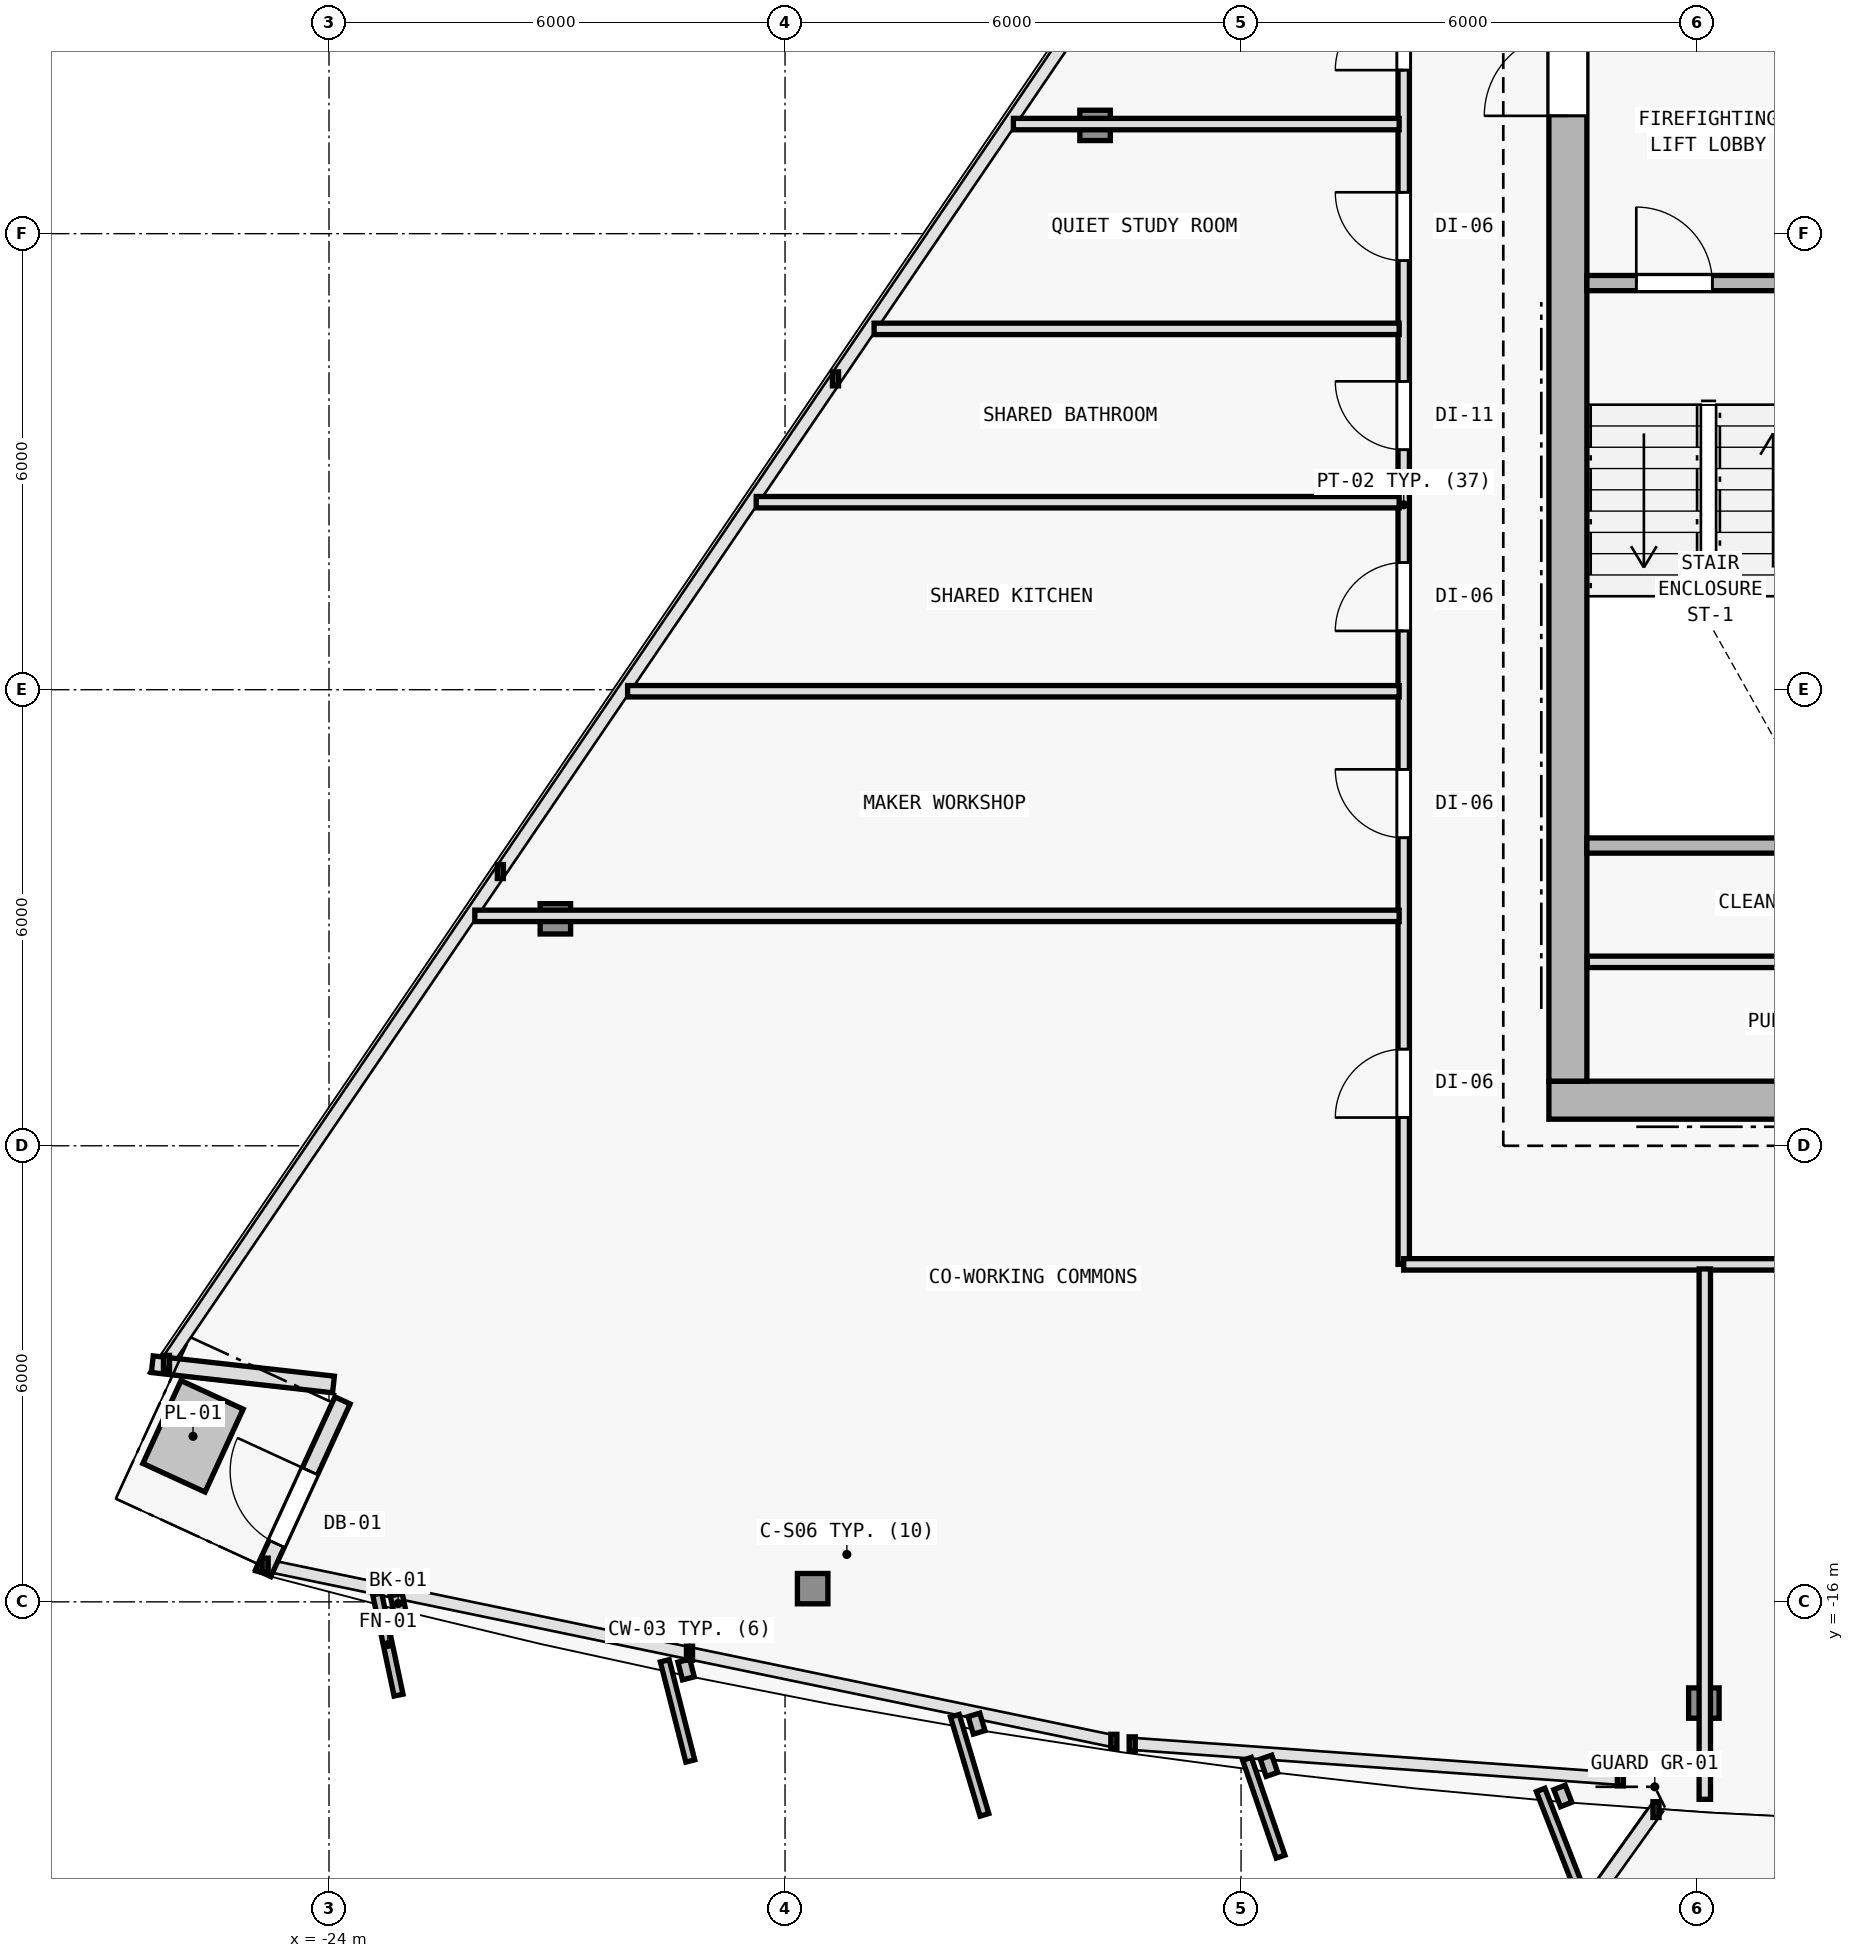
"""IFC4 building model, lengths in metres.
Left out: names, types, materials, properties, quantities, classifications, styles, units other than length and angle.
Written with IfcOpenShell. Run it as: python <this file> out.ifc"""

import sys

from ifc_helpers import new_model, si_unit, direction, frame, frame_2d, origin, origin_2d, place, context, subcontext, project, spatial, rectangle, i_section, extrude, element, fill, save


model = new_model("IFC4")
c1 = context("Model", 3, precision=1e-05, world=origin(), true_north=direction((0.0, 1.0)))
c2 = subcontext(c1, "Body", "Model", "MODEL_VIEW")
j1 = project(units=[si_unit("LENGTHUNIT", "METRE"), si_unit("PLANEANGLEUNIT", "RADIAN")], contexts=[c1])
p1 = place(None, origin())
s1 = spatial("IfcSite", under=j1, at=p1, CompositionType="ELEMENT")
p2 = place(p1, origin())
s2 = spatial("IfcBuilding", under=s1, at=p2, CompositionType="ELEMENT")
p3 = place(p2, frame((0.0, 0.0, 163.8)))
s3 = spatial("IfcBuildingStorey", under=s2, at=p3, CompositionType="ELEMENT", Elevation=163.8)
for number, where, z_axis, x_axis in (
    (1, (-7.7, -9.4, 0.0), (0.0, 0.0, 1.0), (1.0, 0.0, 0.0)),
    (2, (-7.7, 2.0, 0.0), (0.0, 0.0, 1.0), (1.0, 0.0, 0.0)),
):
    element("IfcColumn", number, at=place(p3, frame(where, z_axis=z_axis, x_axis=x_axis)), inside=s3, PredefinedType="COLUMN", context=c2, shape_type="SweptSolid", body=[
        extrude(i_section(OverallWidth=0.404, OverallDepth=0.407, WebThickness=0.017, FlangeThickness=0.028, FilletRadius=0.015, at=origin_2d()), origin(), (0.0, 0.0, 1.0), 3.6),
    ])
p4 = place(p3, frame((-17.637, -15.826, 0.005), z_axis=(0.020662834962, 0.033509136961, 0.999224792022), x_axis=(-0.851183725565, 0.524867855115, 0.0)))
e3 = element("IfcColumn", 3, at=p4, inside=s3, PredefinedType="COLUMN", context=c2, shape_type="SweptSolid", body=[
    extrude(i_section(OverallWidth=0.401, OverallDepth=0.399, WebThickness=0.016, FlangeThickness=0.025, FilletRadius=0.015, at=origin_2d()), origin(), (0.0, 0.0, 1.0), 3.592),
])
p5 = place(p3, frame((-5.911, -17.332, 0.005), z_axis=(0.00693381708, 0.03528089279, 0.999353381334), x_axis=(-0.981229659911, 0.192842823335, 0.0)))
e4 = element("IfcColumn", 4, at=p5, inside=s3, PredefinedType="COLUMN", context=c2, shape_type="SweptSolid", body=[
    extrude(i_section(OverallWidth=0.401, OverallDepth=0.399, WebThickness=0.016, FlangeThickness=0.025, FilletRadius=0.015, at=origin_2d()), origin(), (0.0, 0.0, 1.0), 3.592),
])
p6 = place(p3, frame((-13.921, 3.425, 0.005), z_axis=(0.017070406608, 0.009521342331, 0.99980895438), x_axis=(-0.487119351792, 0.873335409284, 0.0)))
e5 = element("IfcColumn", 5, at=p6, inside=s3, PredefinedType="COLUMN", context=c2, shape_type="SweptSolid", body=[
    extrude(i_section(OverallWidth=0.401, OverallDepth=0.399, WebThickness=0.016, FlangeThickness=0.025, FilletRadius=0.015, at=origin_2d()), origin(), (0.0, 0.0, 1.0), 3.59),
])
p7 = place(p3, frame((-21.022, -7.014, 0.005), z_axis=(0.025222449659, 0.021619242565, 0.999448065876), x_axis=(-0.650791373456, 0.759256602365, 0.0)))
e6 = element("IfcColumn", 6, at=p7, inside=s3, PredefinedType="COLUMN", context=c2, shape_type="SweptSolid", body=[
    extrude(i_section(OverallWidth=0.401, OverallDepth=0.399, WebThickness=0.016, FlangeThickness=0.025, FilletRadius=0.015, at=origin_2d()), origin(), (0.0, 0.0, 1.0), 3.591),
])
p8 = place(p3, frame((-23.941, -13.14, 0.0), z_axis=(0.0, 0.0, 1.0), x_axis=(-0.993825249999, 0.110956624245, 0.0)))
e7 = element("IfcWall", 7, at=p8, inside=s3, PredefinedType="SOLIDWALL", context=c2, shape_type="SweptSolid", body=[
    extrude(rectangle(XDim=2.398, YDim=0.22, at=frame_2d((1.199, 0.0))), origin(), (0.0, 0.0, 1.0), 3.35),
])
p9 = place(p3, frame((-24.866, -15.622, 0.0), z_axis=(0.0, 0.0, 1.0), x_axis=(0.417478378529, 0.908686856657, 0.0)))
e8 = element("IfcWall", 8, at=p9, inside=s3, PredefinedType="SOLIDWALL", context=c2, shape_type="SweptSolid", body=[
    extrude(rectangle(XDim=2.5, YDim=0.22, at=frame_2d((1.25, 0.0))), origin(), (0.0, 0.0, 1.0), 3.35),
])
p10 = place(p9, frame((0.425, 0.0, 0.0)))
e9 = element("IfcOpeningElement", 9, at=p10, cuts=e8, PredefinedType="OPENING", context=c2, shape_type="SweptSolid", body=[
    extrude(rectangle(XDim=1.05, YDim=2.15, at=frame_2d((0.525, 1.075))), frame((0.0, 0.12, 0.0), z_axis=(0.0, -1.0, 0.0), x_axis=(1.0, 0.0, 0.0)), (0.0, 0.0, 1.0), 0.24),
])
p11 = place(p3, frame((-7.95, -9.4, 0.0), z_axis=(0.0, 0.0, 1.0), x_axis=(1.0, 0.0, 0.0)))
e10 = element("IfcWall", 10, at=p11, inside=s3, PredefinedType="SHEAR", context=c2, shape_type="SweptSolid", body=[
    extrude(rectangle(XDim=15.9, YDim=0.5, at=frame_2d((7.95, 0.0))), origin(), (0.0, 0.0, 1.0), 3.35),
])
p12 = place(p11, frame((9.6, 0.0, 0.0)))
e11 = element("IfcOpeningElement", 11, at=p12, cuts=e10, PredefinedType="OPENING", context=c2, shape_type="SweptSolid", body=[
    extrude(rectangle(XDim=1.5, YDim=2.2, at=frame_2d((0.75, 1.1))), frame((0.0, 0.26, 0.0), z_axis=(0.0, -1.0, 0.0), x_axis=(1.0, 0.0, 0.0)), (0.0, 0.0, 1.0), 0.52),
])
p13 = place(p3, frame((-7.7, -9.15, 0.0), z_axis=(0.0, 0.0, 1.0), x_axis=(0.0, 1.0, 0.0)))
e12 = element("IfcWall", 12, at=p13, inside=s3, PredefinedType="SHEAR", context=c2, shape_type="SweptSolid", body=[
    extrude(rectangle(XDim=19.1, YDim=0.5, at=frame_2d((9.55, 0.0))), origin(), (0.0, 0.0, 1.0), 3.35),
])
p14 = place(p13, frame((12.7, 0.0, 0.0)))
e13 = element("IfcOpeningElement", 13, at=p14, cuts=e12, PredefinedType="OPENING", context=c2, shape_type="SweptSolid", body=[
    extrude(rectangle(XDim=1.1, YDim=2.15, at=frame_2d((0.55, 1.075))), frame((0.0, 0.26, 0.0), z_axis=(0.0, -1.0, 0.0), x_axis=(1.0, 0.0, 0.0)), (0.0, 0.0, 1.0), 0.52),
])
p15 = place(p3, frame((-7.45, 1.35, 0.0), z_axis=(0.0, 0.0, 1.0), x_axis=(1.0, 0.0, 0.0)))
e14 = element("IfcWall", 14, at=p15, inside=s3, PredefinedType="SOLIDWALL", context=c2, shape_type="SweptSolid", body=[
    extrude(rectangle(XDim=3.4, YDim=0.2, at=frame_2d((1.7, 0.0))), origin(), (0.0, 0.0, 1.0), 3.35),
])
p16 = place(p15, frame((0.65, 0.0, 0.0)))
e15 = element("IfcOpeningElement", 15, at=p16, cuts=e14, PredefinedType="OPENING", context=c2, shape_type="SweptSolid", body=[
    extrude(rectangle(XDim=1.0, YDim=2.15, at=frame_2d((0.5, 1.075))), frame((0.0, 0.11, 0.0), z_axis=(0.0, -1.0, 0.0), x_axis=(1.0, 0.0, 0.0)), (0.0, 0.0, 1.0), 0.22),
])
p17 = place(p3, frame((-7.45, -6.05, 0.0), z_axis=(0.0, 0.0, 1.0), x_axis=(1.0, 0.0, 0.0)))
e16 = element("IfcWall", 16, at=p17, inside=s3, PredefinedType="SOLIDWALL", context=c2, shape_type="SweptSolid", body=[
    extrude(rectangle(XDim=3.4, YDim=0.2, at=frame_2d((1.7, 0.0))), origin(), (0.0, 0.0, 1.0), 3.35),
])
p18 = place(p3, frame((-7.445, -7.58, 0.0), z_axis=(0.0, 0.0, 1.0), x_axis=(1.0, 0.0, 0.0)))
e17 = element("IfcWall", 17, at=p18, inside=s3, PredefinedType="PARTITIONING", context=c2, shape_type="SweptSolid", body=[
    extrude(rectangle(XDim=6.195, YDim=0.15, at=frame_2d((3.098, 0.0))), origin(), (0.0, 0.0, 1.0), 3.35),
])
p19 = place(p3, frame((-9.86, -11.56, 0.0), z_axis=(0.0, 0.0, 1.0), x_axis=(0.0, 1.0, 0.0)))
e18 = element("IfcWall", 18, at=p19, inside=s3, PredefinedType="PARTITIONING", context=c2, shape_type="SweptSolid", body=[
    extrude(rectangle(XDim=19.986, YDim=0.15, at=frame_2d((9.993, 0.0))), origin(), (0.0, 0.0, 1.0), 2.725),
])
p20 = place(p19, frame((10.717, 0.0, 0.0)))
e19 = element("IfcOpeningElement", 19, at=p20, cuts=e18, PredefinedType="OPENING", context=c2, shape_type="SweptSolid", body=[
    extrude(rectangle(XDim=0.9, YDim=2.1, at=frame_2d((0.45, 1.05))), frame((0.0, 0.085, 0.0), z_axis=(0.0, -1.0, 0.0), x_axis=(1.0, 0.0, 0.0)), (0.0, 0.0, 1.0), 0.17),
])
p21 = place(p19, frame((8.333, 0.0, 0.0)))
e20 = element("IfcOpeningElement", 20, at=p21, cuts=e18, PredefinedType="OPENING", context=c2, shape_type="SweptSolid", body=[
    extrude(rectangle(XDim=0.9, YDim=2.1, at=frame_2d((0.45, 1.05))), frame((0.0, 0.085, 0.0), z_axis=(0.0, -1.0, 0.0), x_axis=(1.0, 0.0, 0.0)), (0.0, 0.0, 1.0), 0.17),
])
p22 = place(p19, frame((5.612, 0.0, 0.0)))
e21 = element("IfcOpeningElement", 21, at=p22, cuts=e18, PredefinedType="OPENING", context=c2, shape_type="SweptSolid", body=[
    extrude(rectangle(XDim=0.9, YDim=2.1, at=frame_2d((0.45, 1.05))), frame((0.0, 0.085, 0.0), z_axis=(0.0, -1.0, 0.0), x_axis=(1.0, 0.0, 0.0)), (0.0, 0.0, 1.0), 0.17),
])
p23 = place(p19, frame((1.932, 0.0, 0.0)))
e22 = element("IfcOpeningElement", 22, at=p23, cuts=e18, PredefinedType="OPENING", context=c2, shape_type="SweptSolid", body=[
    extrude(rectangle(XDim=0.9, YDim=2.1, at=frame_2d((0.45, 1.05))), frame((0.0, 0.085, 0.0), z_axis=(0.0, -1.0, 0.0), x_axis=(1.0, 0.0, 0.0)), (0.0, 0.0, 1.0), 0.17),
])
p24 = place(p19, frame((18.115, 0.0, 0.0)))
e23 = element("IfcOpeningElement", 23, at=p24, cuts=e18, PredefinedType="OPENING", context=c2, shape_type="SweptSolid", body=[
    extrude(rectangle(XDim=0.9, YDim=2.1, at=frame_2d((0.45, 1.05))), frame((0.0, 0.085, 0.0), z_axis=(0.0, -1.0, 0.0), x_axis=(1.0, 0.0, 0.0)), (0.0, 0.0, 1.0), 0.17),
])
p25 = place(p19, frame((15.711, 0.0, 0.0)))
e24 = element("IfcOpeningElement", 24, at=p25, cuts=e18, PredefinedType="OPENING", context=c2, shape_type="SweptSolid", body=[
    extrude(rectangle(XDim=0.9, YDim=2.1, at=frame_2d((0.45, 1.05))), frame((0.0, 0.085, 0.0), z_axis=(0.0, -1.0, 0.0), x_axis=(1.0, 0.0, 0.0)), (0.0, 0.0, 1.0), 0.17),
])
p26 = place(p19, frame((13.205, 0.0, 0.0)))
e25 = element("IfcOpeningElement", 25, at=p26, cuts=e18, PredefinedType="OPENING", context=c2, shape_type="SweptSolid", body=[
    extrude(rectangle(XDim=0.9, YDim=2.1, at=frame_2d((0.45, 1.05))), frame((0.0, 0.085, 0.0), z_axis=(0.0, -1.0, 0.0), x_axis=(1.0, 0.0, 0.0)), (0.0, 0.0, 1.0), 0.17),
])
p27 = place(p3, frame((13.18, -11.56, 0.0), z_axis=(0.0, 0.0, 1.0), x_axis=(-1.0, 0.0, 0.0)))
e26 = element("IfcWall", 26, at=p27, inside=s3, PredefinedType="PARTITIONING", context=c2, shape_type="SweptSolid", body=[
    extrude(rectangle(XDim=23.04, YDim=0.15, at=frame_2d((11.52, 0.0))), origin(), (0.0, 0.0, 1.0), 2.725),
])
p28 = place(p27, frame((12.73, 0.0, 0.0)))
e27 = element("IfcOpeningElement", 27, at=p28, cuts=e26, PredefinedType="OPENING", context=c2, shape_type="SweptSolid", body=[
    extrude(rectangle(XDim=0.9, YDim=2.1, at=frame_2d((0.45, 1.05))), frame((0.0, 0.085, 0.0), z_axis=(0.0, -1.0, 0.0), x_axis=(1.0, 0.0, 0.0)), (0.0, 0.0, 1.0), 0.17),
])
p29 = place(p27, frame((3.28, 0.0, 0.0)))
e28 = element("IfcOpeningElement", 28, at=p29, cuts=e26, PredefinedType="OPENING", context=c2, shape_type="SweptSolid", body=[
    extrude(rectangle(XDim=0.9, YDim=2.1, at=frame_2d((0.45, 1.05))), frame((0.0, 0.085, 0.0), z_axis=(0.0, -1.0, 0.0), x_axis=(1.0, 0.0, 0.0)), (0.0, 0.0, 1.0), 0.17),
])
p30 = place(p3, frame((-5.898, -11.62, 0.0), z_axis=(0.0, 0.0, 1.0), x_axis=(0.0, -1.0, 0.0)))
e29 = element("IfcWall", 29, at=p30, inside=s3, PredefinedType="PARTITIONING", context=c2, shape_type="SweptSolid", body=[
    extrude(rectangle(XDim=6.978, YDim=0.15, at=frame_2d((3.489, 0.0))), origin(), (0.0, 0.0, 1.0), 2.725),
])
p31 = place(p3, frame((-9.92, 3.442, 0.0), z_axis=(0.0, 0.0, 1.0), x_axis=(-1.0, 0.0, 0.0)))
e30 = element("IfcWall", 30, at=p31, inside=s3, PredefinedType="PARTITIONING", context=c2, shape_type="SweptSolid", body=[
    extrude(rectangle(XDim=5.075, YDim=0.15, at=frame_2d((2.538, 0.0))), origin(), (0.0, 0.0, 1.0), 2.935),
])
p32 = place(p3, frame((-9.92, -6.975, 0.0), z_axis=(0.0, 0.0, 1.0), x_axis=(-1.0, 0.0, 0.0)))
e31 = element("IfcWall", 31, at=p32, inside=s3, PredefinedType="PARTITIONING", context=c2, shape_type="SweptSolid", body=[
    extrude(rectangle(XDim=12.162, YDim=0.15, at=frame_2d((6.081, 0.0))), origin(), (0.0, 0.0, 1.0), 2.725),
])
p33 = place(p3, frame((-9.92, -1.533, 0.0), z_axis=(0.0, 0.0, 1.0), x_axis=(-1.0, 0.0, 0.0)))
e32 = element("IfcWall", 32, at=p33, inside=s3, PredefinedType="PARTITIONING", context=c2, shape_type="SweptSolid", body=[
    extrude(rectangle(XDim=8.459, YDim=0.15, at=frame_2d((4.23, 0.0))), origin(), (0.0, 0.0, 1.0), 2.725),
])
p34 = place(p3, frame((-9.92, -4.02, 0.0), z_axis=(0.0, 0.0, 1.0), x_axis=(-1.0, 0.0, 0.0)))
e33 = element("IfcWall", 33, at=p34, inside=s3, PredefinedType="PARTITIONING", context=c2, shape_type="SweptSolid", body=[
    extrude(rectangle(XDim=10.151, YDim=0.15, at=frame_2d((5.076, 0.0))), origin(), (0.0, 0.0, 1.0), 2.725),
])
p35 = place(p3, frame((-9.92, 0.747, 0.0), z_axis=(0.0, 0.0, 1.0), x_axis=(-1.0, 0.0, 0.0)))
e34 = element("IfcWall", 34, at=p35, inside=s3, PredefinedType="PARTITIONING", context=c2, shape_type="SweptSolid", body=[
    extrude(rectangle(XDim=6.908, YDim=0.15, at=frame_2d((3.454, 0.0))), origin(), (0.0, 0.0, 1.0), 2.725),
])
p36 = place(p10, origin())
e35 = element("IfcDoor", 35, at=p36, inside=s3, OperationType="SINGLE_SWING_RIGHT", PredefinedType="DOOR", context=c2, shape_type="SweptSolid", body=[
    extrude(rectangle(XDim=1.05, YDim=2.15, at=frame_2d((0.525, 1.075))), frame((0.0, 0.025, 0.0), z_axis=(0.0, -1.0, 0.0), x_axis=(1.0, 0.0, 0.0)), (0.0, 0.0, 1.0), 0.05),
])
fill(e9, e35)
p37 = place(p14, origin())
e36 = element("IfcDoor", 36, at=p37, inside=s3, OperationType="SINGLE_SWING_LEFT", PredefinedType="DOOR", context=c2, shape_type="SweptSolid", body=[
    extrude(rectangle(XDim=1.1, YDim=2.15, at=frame_2d((0.55, 1.075))), frame((0.0, 0.025, 0.0), z_axis=(0.0, -1.0, 0.0), x_axis=(1.0, 0.0, 0.0)), (0.0, 0.0, 1.0), 0.05),
])
fill(e13, e36)
p38 = place(p16, origin())
e37 = element("IfcDoor", 37, at=p38, inside=s3, OperationType="SINGLE_SWING_LEFT", PredefinedType="DOOR", context=c2, shape_type="SweptSolid", body=[
    extrude(rectangle(XDim=1.0, YDim=2.15, at=frame_2d((0.5, 1.075))), frame((0.0, 0.025, 0.0), z_axis=(0.0, -1.0, 0.0), x_axis=(1.0, 0.0, 0.0)), (0.0, 0.0, 1.0), 0.05),
])
fill(e15, e37)
p39 = place(p20, origin())
e38 = element("IfcDoor", 38, at=p39, inside=s3, OperationType="SINGLE_SWING_RIGHT", PredefinedType="DOOR", context=c2, shape_type="SweptSolid", body=[
    extrude(rectangle(XDim=0.9, YDim=2.1, at=frame_2d((0.45, 1.05))), frame((0.0, 0.025, 0.0), z_axis=(0.0, -1.0, 0.0), x_axis=(1.0, 0.0, 0.0)), (0.0, 0.0, 1.0), 0.05),
])
fill(e19, e38)
p40 = place(p21, origin())
e39 = element("IfcDoor", 39, at=p40, inside=s3, OperationType="SINGLE_SWING_LEFT", PredefinedType="DOOR", context=c2, shape_type="SweptSolid", body=[
    extrude(rectangle(XDim=0.9, YDim=2.1, at=frame_2d((0.45, 1.05))), frame((0.0, 0.025, 0.0), z_axis=(0.0, -1.0, 0.0), x_axis=(1.0, 0.0, 0.0)), (0.0, 0.0, 1.0), 0.05),
])
fill(e20, e39)
p41 = place(p22, origin())
e40 = element("IfcDoor", 40, at=p41, inside=s3, OperationType="SINGLE_SWING_RIGHT", PredefinedType="DOOR", context=c2, shape_type="SweptSolid", body=[
    extrude(rectangle(XDim=0.9, YDim=2.1, at=frame_2d((0.45, 1.05))), frame((0.0, 0.025, 0.0), z_axis=(0.0, -1.0, 0.0), x_axis=(1.0, 0.0, 0.0)), (0.0, 0.0, 1.0), 0.05),
])
fill(e21, e40)
p42 = place(p23, origin())
e41 = element("IfcDoor", 41, at=p42, inside=s3, OperationType="SINGLE_SWING_LEFT", PredefinedType="DOOR", context=c2, shape_type="SweptSolid", body=[
    extrude(rectangle(XDim=0.9, YDim=2.1, at=frame_2d((0.45, 1.05))), frame((0.0, 0.025, 0.0), z_axis=(0.0, -1.0, 0.0), x_axis=(1.0, 0.0, 0.0)), (0.0, 0.0, 1.0), 0.05),
])
fill(e22, e41)
p43 = place(p25, origin())
e42 = element("IfcDoor", 42, at=p43, inside=s3, OperationType="SINGLE_SWING_LEFT", PredefinedType="DOOR", context=c2, shape_type="SweptSolid", body=[
    extrude(rectangle(XDim=0.9, YDim=2.1, at=frame_2d((0.45, 1.05))), frame((0.0, 0.025, 0.0), z_axis=(0.0, -1.0, 0.0), x_axis=(1.0, 0.0, 0.0)), (0.0, 0.0, 1.0), 0.05),
])
fill(e24, e42)
p44 = place(p26, origin())
e43 = element("IfcDoor", 43, at=p44, inside=s3, OperationType="SINGLE_SWING_RIGHT", PredefinedType="DOOR", context=c2, shape_type="SweptSolid", body=[
    extrude(rectangle(XDim=0.9, YDim=2.1, at=frame_2d((0.45, 1.05))), frame((0.0, 0.025, 0.0), z_axis=(0.0, -1.0, 0.0), x_axis=(1.0, 0.0, 0.0)), (0.0, 0.0, 1.0), 0.05),
])
fill(e25, e43)
save(model, sys.argv[1])
